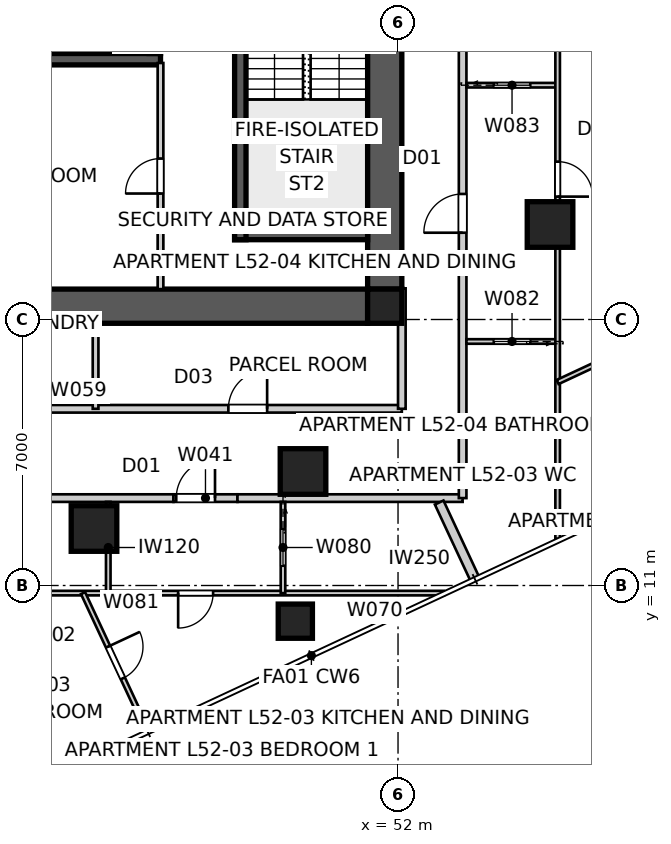
"""IFC4 building model, lengths in metres.
Left out: names, types, materials, properties, quantities, classifications, styles, units other than length and angle.
Written with IfcOpenShell. Run it as: python <this file> out.ifc"""

import sys

from ifc_helpers import new_model, si_unit, direction, frame, frame_2d, origin, origin_2d, place, context, subcontext, project, spatial, polyline, rectangle, outline, extrude, element, fill, save


model = new_model("IFC4")
c1 = context("Model", 3, precision=1e-05, world=origin(), true_north=direction((0.0, 1.0)))
c2 = subcontext(c1, "Body", "Model", "MODEL_VIEW")
j1 = project(units=[si_unit("LENGTHUNIT", "METRE"), si_unit("PLANEANGLEUNIT", "RADIAN")], contexts=[c1])
p1 = place(None, origin())
s1 = spatial("IfcSite", under=j1, at=p1, CompositionType="ELEMENT")
p2 = place(p1, origin())
s2 = spatial("IfcBuilding", under=s1, at=p2, CompositionType="ELEMENT")
p3 = place(p2, frame((0.0, 0.0, 189.6)))
s3 = spatial("IfcBuildingStorey", under=s2, at=p3, CompositionType="ELEMENT", Elevation=189.6)
p4 = place(p3, frame((51.2, 18.35, 0.0), z_axis=(0.0, 0.0, 1.0), x_axis=(-1.0, 0.0, 0.0)))
e1 = element("IfcWall", 1, at=p4, inside=s3, PredefinedType="SHEAR", context=c2, shape_type="SweptSolid", body=[
    extrude(outline(polyline([(0.0, -0.45), (22.4, -0.45), (22.4, -0.025), (22.85, -0.025), (22.85, 0.025), (22.4, 0.025), (22.4, 0.45), (0.0, 0.45), (0.0, 0.025), (-0.45, 0.025), (-0.45, -0.025), (0.0, -0.025), (0.0, -0.45)])), origin(), (0.0, 0.0, 1.0), 3.4),
])
p5 = place(p3, frame((51.65, 18.8, 0.0), z_axis=(0.0, 0.0, 1.0), x_axis=(0.0, 1.0, 0.0)))
e2 = element("IfcWall", 2, at=p5, inside=s3, PredefinedType="SHEAR", context=c2, shape_type="SweptSolid", body=[
    extrude(outline(polyline([(0.0, -0.45), (22.4, -0.45), (22.4, -0.025), (22.85, -0.025), (22.85, 0.025), (22.4, 0.025), (22.4, 0.45), (0.0, 0.45), (0.0, 0.025), (-0.45, 0.025), (-0.45, -0.025), (0.0, -0.025), (0.0, -0.45)])), origin(), (0.0, 0.0, 1.0), 3.4),
])
p6 = place(p5, frame((11.14, 0.0, 0.0)))
e3 = element("IfcOpeningElement", 3, at=p6, cuts=e2, PredefinedType="OPENING", context=c2, shape_type="SweptSolid", body=[
    extrude(rectangle(XDim=1.02, YDim=2.4, at=frame_2d((0.51, 1.2))), frame((0.0, 0.46, 0.0), z_axis=(0.0, -1.0, 0.0), x_axis=(1.0, 0.0, 0.0)), (0.0, 0.0, 1.0), 0.92),
])
p7 = place(p3, frame((45.75, 24.85, 0.0), z_axis=(0.0, 0.0, 1.0), x_axis=(-1.0, 0.0, 0.0)))
e4 = element("IfcWall", 4, at=p7, inside=s3, PredefinedType="SHEAR", context=c2, shape_type="SweptSolid", body=[
    extrude(rectangle(XDim=11.5, YDim=0.3, at=frame_2d((5.75, 0.0))), origin(), (0.0, 0.0, 1.0), 3.4),
])
p8 = place(p3, frame((45.6, 27.8, 0.0), z_axis=(0.0, 0.0, 1.0), x_axis=(0.0, -1.0, 0.0)))
e5 = element("IfcWall", 5, at=p8, inside=s3, PredefinedType="SHEAR", context=c2, shape_type="SweptSolid", body=[
    extrude(rectangle(XDim=2.8, YDim=0.3, at=frame_2d((1.4, 0.0))), origin(), (0.0, 0.0, 1.0), 3.4),
])
p9 = place(p3, frame((47.85, 27.8, 0.0), z_axis=(0.0, 0.0, 1.0), x_axis=(0.0, -1.0, 0.0)))
e6 = element("IfcWall", 6, at=p9, inside=s3, PredefinedType="SHEAR", context=c2, shape_type="SweptSolid", body=[
    extrude(rectangle(XDim=7.7, YDim=0.3, at=frame_2d((3.85, 0.0))), origin(), (0.0, 0.0, 1.0), 3.4),
])
p10 = place(p3, frame((51.2, 20.25, 0.0), z_axis=(0.0, 0.0, 1.0), x_axis=(-1.0, 0.0, 0.0)))
e7 = element("IfcWall", 7, at=p10, inside=s3, PredefinedType="SHEAR", context=c2, shape_type="SweptSolid", body=[
    extrude(rectangle(XDim=3.5, YDim=0.3, at=frame_2d((1.75, 0.0))), origin(), (0.0, 0.0, 1.0), 3.4),
])
for number, where, z_axis, x_axis in (
    (8, (51.65, 18.35, 0.0), (0.0, 0.0, 1.0), (1.0, 0.0, 0.0)),
    (9, (49.298, 10.061, 0.0), (0.0, 0.0, 1.0), (1.0, 0.0, 0.0)),
):
    element("IfcColumn", number, at=place(p3, frame(where, z_axis=z_axis, x_axis=x_axis)), inside=s3, PredefinedType="COLUMN", context=c2, shape_type="SweptSolid", body=[
        extrude(rectangle(XDim=0.9, YDim=0.9, at=origin_2d()), origin(), (0.0, 0.0, 1.0), 3.4),
    ])
for number, where, z_axis, x_axis in (
    (10, (44.0, 12.5, 0.0), (0.0, 0.0, 1.0), (1.0, 0.0, 0.0)),
    (11, (49.5, 14.0, 0.0), (0.0, 0.0, 1.0), (1.0, 0.0, 0.0)),
    (12, (56.0, 20.5, 0.0), (0.0, 0.0, 1.0), (1.0, 0.0, 0.0)),
):
    element("IfcColumn", number, at=place(p3, frame(where, z_axis=z_axis, x_axis=x_axis)), inside=s3, PredefinedType="COLUMN", context=c2, shape_type="SweptSolid", body=[
        extrude(rectangle(XDim=1.2, YDim=1.2, at=origin_2d()), origin(), (0.0, 0.0, 1.0), 3.4),
    ])
p11 = place(p3, frame((33.908, 13.3, 0.0), z_axis=(0.0, 0.0, 1.0), x_axis=(1.0, 0.0, 0.0)))
e13 = element("IfcWall", 13, at=p11, inside=s3, PredefinedType="PARTITIONING", context=c2, shape_type="SweptSolid", body=[
    extrude(rectangle(XDim=12.183, YDim=0.2, at=frame_2d((6.092, 0.0))), origin(), (0.0, 0.0, 1.0), 3.25),
])
p12 = place(p3, frame((46.092, 13.3, 0.0), z_axis=(0.0, 0.0, 1.0), x_axis=(1.0, 0.0, 0.0)))
e14 = element("IfcWall", 14, at=p12, inside=s3, PredefinedType="PARTITIONING", context=c2, shape_type="SweptSolid", body=[
    extrude(rectangle(XDim=1.684, YDim=0.2, at=frame_2d((0.842, 0.0))), origin(), (0.0, 0.0, 1.0), 2.55),
])
p13 = place(p12, frame((0.073, 0.0, 0.0)))
e15 = element("IfcOpeningElement", 15, at=p13, cuts=e14, PredefinedType="OPENING", context=c2, shape_type="SweptSolid", body=[
    extrude(rectangle(XDim=1.02, YDim=2.34, at=frame_2d((0.51, 1.17))), frame((0.0, 0.11, 0.0), z_axis=(0.0, -1.0, 0.0), x_axis=(1.0, 0.0, 0.0)), (0.0, 0.0, 1.0), 0.22),
])
p14 = place(p3, frame((47.775, 13.3, 0.0), z_axis=(0.0, 0.0, 1.0), x_axis=(1.0, 0.0, 0.0)))
e16 = element("IfcWall", 16, at=p14, inside=s3, PredefinedType="PARTITIONING", context=c2, shape_type="SweptSolid", body=[
    extrude(rectangle(XDim=5.925, YDim=0.2, at=frame_2d((2.962, 0.0))), origin(), (0.0, 0.0, 1.0), 3.25),
])
p15 = place(p3, frame((53.7, 13.3, 0.0), z_axis=(0.0, 0.0, 1.0), x_axis=(0.0, 1.0, 0.0)))
e17 = element("IfcWall", 17, at=p15, inside=s3, PredefinedType="PARTITIONING", context=c2, shape_type="SweptSolid", body=[
    extrude(rectangle(XDim=33.8, YDim=0.2, at=frame_2d((16.9, 0.0))), origin(), (0.0, 0.0, 1.0), 3.25),
])
p16 = place(p15, frame((6.984, 0.0, 0.0)))
e18 = element("IfcOpeningElement", 18, at=p16, cuts=e17, PredefinedType="OPENING", context=c2, shape_type="SweptSolid", body=[
    extrude(rectangle(XDim=1.02, YDim=2.34, at=frame_2d((0.51, 1.17))), frame((0.0, 0.11, 0.0), z_axis=(0.0, -1.0, 0.0), x_axis=(1.0, 0.0, 0.0)), (0.0, 0.0, 1.0), 0.22),
])
p17 = place(p15, frame((29.648, 0.0, 0.0)))
e19 = element("IfcOpeningElement", 19, at=p17, cuts=e17, PredefinedType="OPENING", context=c2, shape_type="SweptSolid", body=[
    extrude(rectangle(XDim=1.02, YDim=2.34, at=frame_2d((0.51, 1.17))), frame((0.0, 0.11, 0.0), z_axis=(0.0, -1.0, 0.0), x_axis=(1.0, 0.0, 0.0)), (0.0, 0.0, 1.0), 0.22),
])
p18 = place(p15, frame((15.16, 0.0, 0.0)))
e20 = element("IfcOpeningElement", 20, at=p18, cuts=e17, PredefinedType="OPENING", context=c2, shape_type="SweptSolid", body=[
    extrude(rectangle(XDim=1.02, YDim=2.34, at=frame_2d((0.51, 1.17))), frame((0.0, 0.11, 0.0), z_axis=(0.0, -1.0, 0.0), x_axis=(1.0, 0.0, 0.0)), (0.0, 0.0, 1.0), 0.22),
])
p19 = place(p3, frame((54.025, 11.162, 0.0), z_axis=(0.0, 0.0, 1.0), x_axis=(-0.422609736898, 0.906311762187, 0.0)))
e21 = element("IfcWall", 21, at=p19, inside=s3, PredefinedType="PARTITIONING", context=c2, shape_type="SweptSolid", body=[
    extrude(rectangle(XDim=2.23, YDim=0.25, at=frame_2d((1.115, 0.0))), origin(), (0.0, 0.0, 1.0), 3.25),
])
p20 = place(p3, frame((45.75, 18.8, 0.0), z_axis=(0.0, 0.0, 1.0), x_axis=(0.0, 1.0, 0.0)))
e22 = element("IfcWall", 22, at=p20, inside=s3, PredefinedType="SOLIDWALL", context=c2, shape_type="SweptSolid", body=[
    extrude(rectangle(XDim=5.95, YDim=0.15, at=frame_2d((2.975, 0.0))), origin(), (0.0, 0.0, 1.0), 3.25),
])
p21 = place(p20, frame((2.515, 0.0, 0.0)))
e23 = element("IfcOpeningElement", 23, at=p21, cuts=e22, PredefinedType="OPENING", context=c2, shape_type="SweptSolid", body=[
    extrude(rectangle(XDim=0.92, YDim=2.1, at=frame_2d((0.46, 1.05))), frame((0.0, 0.085, 0.0), z_axis=(0.0, -1.0, 0.0), x_axis=(1.0, 0.0, 0.0)), (0.0, 0.0, 1.0), 0.17),
])
p22 = place(p3, frame((27.9, 15.65, 0.0), z_axis=(0.0, 0.0, 1.0), x_axis=(1.0, 0.0, 0.0)))
e24 = element("IfcWall", 24, at=p22, inside=s3, PredefinedType="PARTITIONING", context=c2, shape_type="SweptSolid", body=[
    extrude(rectangle(XDim=24.2, YDim=0.2, at=frame_2d((12.1, 0.0))), origin(), (0.0, 0.0, 1.0), 3.25),
])
p23 = place(p22, frame((10.743, 0.0, 0.0)))
e25 = element("IfcOpeningElement", 25, at=p23, cuts=e24, PredefinedType="OPENING", context=c2, shape_type="SweptSolid", body=[
    extrude(rectangle(XDim=1.02, YDim=2.1, at=frame_2d((0.51, 1.05))), frame((0.0, 0.11, 0.0), z_axis=(0.0, -1.0, 0.0), x_axis=(1.0, 0.0, 0.0)), (0.0, 0.0, 1.0), 0.22),
])
p24 = place(p22, frame((19.636, 0.0, 0.0)))
e26 = element("IfcOpeningElement", 26, at=p24, cuts=e24, PredefinedType="OPENING", context=c2, shape_type="SweptSolid", body=[
    extrude(rectangle(XDim=1.02, YDim=2.1, at=frame_2d((0.51, 1.05))), frame((0.0, 0.11, 0.0), z_axis=(0.0, -1.0, 0.0), x_axis=(1.0, 0.0, 0.0)), (0.0, 0.0, 1.0), 0.22),
])
p25 = place(p22, frame((3.297, 0.0, 0.0)))
e27 = element("IfcOpeningElement", 27, at=p25, cuts=e24, PredefinedType="OPENING", context=c2, shape_type="SweptSolid", body=[
    extrude(rectangle(XDim=1.02, YDim=2.1, at=frame_2d((0.51, 1.05))), frame((0.0, 0.11, 0.0), z_axis=(0.0, -1.0, 0.0), x_axis=(1.0, 0.0, 0.0)), (0.0, 0.0, 1.0), 0.22),
])
p26 = place(p3, frame((52.1, 15.65, 0.0), z_axis=(0.0, 0.0, 1.0), x_axis=(0.0, 1.0, 0.0)))
e28 = element("IfcWall", 28, at=p26, inside=s3, PredefinedType="PARTITIONING", context=c2, shape_type="SweptSolid", body=[
    extrude(rectangle(XDim=3.17, YDim=0.2, at=frame_2d((1.585, 0.0))), origin(), (0.0, 0.0, 1.0), 3.25),
])
p27 = place(p3, frame((44.042, 15.65, 0.0), z_axis=(0.0, 0.0, 1.0), x_axis=(0.0, 1.0, 0.0)))
e29 = element("IfcWall", 29, at=p27, inside=s3, PredefinedType="SOLIDWALL", context=c2, shape_type="SweptSolid", body=[
    extrude(rectangle(XDim=2.25, YDim=0.15, at=frame_2d((1.125, 0.0))), origin(), (0.0, 0.0, 1.0), 3.25),
])
p28 = place(p3, frame((53.208, 10.8, 0.0), z_axis=(0.0, 0.0, 1.0), x_axis=(-1.0, 0.0, 0.0)))
e30 = element("IfcWall", 30, at=p28, inside=s3, PredefinedType="PARTITIONING", context=c2, shape_type="SweptSolid", body=[
    extrude(rectangle(XDim=29.593, YDim=0.12, at=frame_2d((14.796, 0.0))), origin(), (0.0, 0.0, 1.0), 3.25),
])
p29 = place(p28, frame((6.074, 0.0, 0.0)))
e31 = element("IfcOpeningElement", 31, at=p29, cuts=e30, PredefinedType="OPENING", context=c2, shape_type="SweptSolid", body=[
    extrude(rectangle(XDim=0.92, YDim=2.34, at=frame_2d((0.46, 1.17))), frame((0.0, 0.07, 0.0), z_axis=(0.0, -1.0, 0.0), x_axis=(1.0, 0.0, 0.0)), (0.0, 0.0, 1.0), 0.14),
])
p30 = place(p28, frame((25.566, 0.0, 0.0)))
e32 = element("IfcOpeningElement", 32, at=p30, cuts=e30, PredefinedType="OPENING", context=c2, shape_type="SweptSolid", body=[
    extrude(rectangle(XDim=0.92, YDim=2.34, at=frame_2d((0.46, 1.17))), frame((0.0, 0.07, 0.0), z_axis=(0.0, -1.0, 0.0), x_axis=(1.0, 0.0, 0.0)), (0.0, 0.0, 1.0), 0.14),
])
p31 = place(p28, frame((18.515, 0.0, 0.0)))
e33 = element("IfcOpeningElement", 33, at=p31, cuts=e30, PredefinedType="OPENING", context=c2, shape_type="SweptSolid", body=[
    extrude(rectangle(XDim=0.96, YDim=2.1, at=frame_2d((0.48, 1.05))), frame((0.0, 0.07, 0.0), z_axis=(0.0, -1.0, 0.0), x_axis=(1.0, 0.0, 0.0)), (0.0, 0.0, 1.0), 0.14),
])
p32 = place(p28, frame((15.493, 0.0, 0.0)))
e34 = element("IfcOpeningElement", 34, at=p32, cuts=e30, PredefinedType="OPENING", context=c2, shape_type="SweptSolid", body=[
    extrude(rectangle(XDim=0.96, YDim=2.1, at=frame_2d((0.48, 1.05))), frame((0.0, 0.07, 0.0), z_axis=(0.0, -1.0, 0.0), x_axis=(1.0, 0.0, 0.0)), (0.0, 0.0, 1.0), 0.14),
])
p33 = place(p28, frame((11.609, 0.0, 0.0)))
e35 = element("IfcOpeningElement", 35, at=p33, cuts=e30, PredefinedType="OPENING", context=c2, shape_type="SweptSolid", body=[
    extrude(rectangle(XDim=0.96, YDim=2.1, at=frame_2d((0.48, 1.05))), frame((0.0, 0.07, 0.0), z_axis=(0.0, -1.0, 0.0), x_axis=(1.0, 0.0, 0.0)), (0.0, 0.0, 1.0), 0.14),
])
p34 = place(p3, frame((44.375, 10.8, 0.0), z_axis=(0.0, 0.0, 1.0), x_axis=(0.0, 1.0, 0.0)))
e36 = element("IfcWall", 36, at=p34, inside=s3, PredefinedType="PARTITIONING", context=c2, shape_type="SweptSolid", body=[
    extrude(rectangle(XDim=2.4, YDim=0.12, at=frame_2d((1.2, 0.0))), origin(), (0.0, 0.0, 1.0), 3.25),
])
p35 = place(p3, frame((48.973, 13.2, 0.0), z_axis=(0.0, 0.0, 1.0), x_axis=(0.0, -1.0, 0.0)))
e37 = element("IfcWall", 37, at=p35, inside=s3, PredefinedType="PARTITIONING", context=c2, shape_type="SweptSolid", body=[
    extrude(rectangle(XDim=2.4, YDim=0.12, at=frame_2d((1.2, 0.0))), origin(), (0.0, 0.0, 1.0), 3.25),
])
p36 = place(p35, frame((0.72, 0.0, 0.0)))
e38 = element("IfcOpeningElement", 38, at=p36, cuts=e37, PredefinedType="OPENING", context=c2, shape_type="SweptSolid", body=[
    extrude(rectangle(XDim=0.96, YDim=2.1, at=frame_2d((0.48, 1.05))), frame((0.0, 0.07, 0.0), z_axis=(0.0, -1.0, 0.0), x_axis=(1.0, 0.0, 0.0)), (0.0, 0.0, 1.0), 0.14),
])
p37 = place(p3, frame((43.712, 10.8, 0.0), z_axis=(0.0, 0.0, 1.0), x_axis=(0.422620823304, -0.906306592556, 0.0)))
e39 = element("IfcWall", 39, at=p37, inside=s3, PredefinedType="PARTITIONING", context=c2, shape_type="SweptSolid", body=[
    extrude(rectangle(XDim=3.99, YDim=0.12, at=frame_2d((1.995, 0.0))), origin(), (0.0, 0.0, 1.0), 3.25),
])
p38 = place(p37, frame((1.555, 0.0, 0.0)))
e40 = element("IfcOpeningElement", 40, at=p38, cuts=e39, PredefinedType="OPENING", context=c2, shape_type="SweptSolid", body=[
    extrude(rectangle(XDim=0.92, YDim=2.34, at=frame_2d((0.46, 1.17))), frame((0.0, 0.07, 0.0), z_axis=(0.0, -1.0, 0.0), x_axis=(1.0, 0.0, 0.0)), (0.0, 0.0, 1.0), 0.14),
])
p39 = place(p3, frame((56.2, 17.422, 0.0), z_axis=(0.0, 0.0, 1.0), x_axis=(-1.0, 0.0, 0.0)))
e41 = element("IfcWall", 41, at=p39, inside=s3, PredefinedType="PARTITIONING", context=c2, shape_type="SweptSolid", body=[
    extrude(rectangle(XDim=2.4, YDim=0.12, at=frame_2d((1.2, 0.0))), origin(), (0.0, 0.0, 1.0), 3.25),
])
p40 = place(p39, frame((0.72, 0.0, 0.0)))
e42 = element("IfcOpeningElement", 42, at=p40, cuts=e41, PredefinedType="OPENING", context=c2, shape_type="SweptSolid", body=[
    extrude(rectangle(XDim=0.96, YDim=2.1, at=frame_2d((0.48, 1.05))), frame((0.0, 0.07, 0.0), z_axis=(0.0, -1.0, 0.0), x_axis=(1.0, 0.0, 0.0)), (0.0, 0.0, 1.0), 0.14),
])
p41 = place(p3, frame((53.8, 24.166, 0.0), z_axis=(0.0, 0.0, 1.0), x_axis=(1.0, 0.0, 0.0)))
e43 = element("IfcWall", 43, at=p41, inside=s3, PredefinedType="PARTITIONING", context=c2, shape_type="SweptSolid", body=[
    extrude(rectangle(XDim=2.4, YDim=0.12, at=frame_2d((1.2, 0.0))), origin(), (0.0, 0.0, 1.0), 2.796),
])
p42 = place(p41, frame((0.72, 0.0, 0.0)))
e44 = element("IfcOpeningElement", 44, at=p42, cuts=e43, PredefinedType="OPENING", context=c2, shape_type="SweptSolid", body=[
    extrude(rectangle(XDim=0.96, YDim=2.1, at=frame_2d((0.48, 1.05))), frame((0.0, 0.07, 0.0), z_axis=(0.0, -1.0, 0.0), x_axis=(1.0, 0.0, 0.0)), (0.0, 0.0, 1.0), 0.14),
])
p43 = place(p3, frame((56.2, 49.642, 0.0), z_axis=(0.0, 0.0, 1.0), x_axis=(0.0, -1.0, 0.0)))
e45 = element("IfcWall", 45, at=p43, inside=s3, PredefinedType="PARTITIONING", context=c2, shape_type="SweptSolid", body=[
    extrude(rectangle(XDim=37.421, YDim=0.12, at=frame_2d((18.71, 0.0))), origin(), (0.0, 0.0, 1.0), 2.55),
])
p44 = place(p43, frame((27.488, 0.0, 0.0)))
e46 = element("IfcOpeningElement", 46, at=p44, cuts=e45, PredefinedType="OPENING", context=c2, shape_type="SweptSolid", body=[
    extrude(rectangle(XDim=0.92, YDim=2.34, at=frame_2d((0.46, 1.17))), frame((0.0, 0.07, 0.0), z_axis=(0.0, -1.0, 0.0), x_axis=(1.0, 0.0, 0.0)), (0.0, 0.0, 1.0), 0.14),
])
p45 = place(p43, frame((5.08, 0.0, 0.0)))
e47 = element("IfcOpeningElement", 47, at=p45, cuts=e45, PredefinedType="OPENING", context=c2, shape_type="SweptSolid", body=[
    extrude(rectangle(XDim=0.92, YDim=2.34, at=frame_2d((0.46, 1.17))), frame((0.0, 0.07, 0.0), z_axis=(0.0, -1.0, 0.0), x_axis=(1.0, 0.0, 0.0)), (0.0, 0.0, 1.0), 0.14),
])
p46 = place(p43, frame((19.592, 0.0, 0.0)))
e48 = element("IfcOpeningElement", 48, at=p46, cuts=e45, PredefinedType="OPENING", context=c2, shape_type="SweptSolid", body=[
    extrude(rectangle(XDim=0.92, YDim=2.34, at=frame_2d((0.46, 1.17))), frame((0.0, 0.07, 0.0), z_axis=(0.0, -1.0, 0.0), x_axis=(1.0, 0.0, 0.0)), (0.0, 0.0, 1.0), 0.14),
])
p47 = place(p3, frame((65.303, 20.6, 0.0), z_axis=(0.0, 0.0, 1.0), x_axis=(-0.906300466163, -0.422633961049, 0.0)))
e49 = element("IfcWall", 49, at=p47, inside=s3, PredefinedType="PARTITIONING", context=c2, shape_type="SweptSolid", body=[
    extrude(rectangle(XDim=10.044, YDim=0.12, at=frame_2d((5.022, 0.0))), origin(), (0.0, 0.0, 1.0), 3.25),
])
p48 = place(p47, frame((6.892, 0.0, 0.0)))
e50 = element("IfcOpeningElement", 50, at=p48, cuts=e49, PredefinedType="OPENING", context=c2, shape_type="SweptSolid", body=[
    extrude(rectangle(XDim=0.92, YDim=2.34, at=frame_2d((0.46, 1.17))), frame((0.0, 0.07, 0.0), z_axis=(0.0, -1.0, 0.0), x_axis=(1.0, 0.0, 0.0)), (0.0, 0.0, 1.0), 0.14),
])
p49 = place(p47, frame((1.9, 0.0, 0.0)))
e51 = element("IfcOpeningElement", 51, at=p49, cuts=e49, PredefinedType="OPENING", context=c2, shape_type="SweptSolid", body=[
    extrude(rectangle(XDim=0.92, YDim=2.34, at=frame_2d((0.46, 1.17))), frame((0.0, 0.07, 0.0), z_axis=(0.0, -1.0, 0.0), x_axis=(1.0, 0.0, 0.0)), (0.0, 0.0, 1.0), 0.14),
])
p50 = place(p24, origin())
e52 = element("IfcDoor", 52, at=p50, inside=s3, OperationType="SINGLE_SWING_RIGHT", PredefinedType="DOOR", context=c2, shape_type="SweptSolid", body=[
    extrude(rectangle(XDim=1.02, YDim=2.1, at=frame_2d((0.51, 1.05))), frame((0.0, 0.025, 0.0), z_axis=(0.0, -1.0, 0.0), x_axis=(1.0, 0.0, 0.0)), (0.0, 0.0, 1.0), 0.05),
])
fill(e26, e52)
p51 = place(p16, origin())
e53 = element("IfcDoor", 53, at=p51, inside=s3, OperationType="SINGLE_SWING_LEFT", PredefinedType="DOOR", context=c2, shape_type="SweptSolid", body=[
    extrude(rectangle(XDim=1.02, YDim=2.34, at=frame_2d((0.51, 1.17))), frame((0.0, 0.025, 0.0), z_axis=(0.0, -1.0, 0.0), x_axis=(1.0, 0.0, 0.0)), (0.0, 0.0, 1.0), 0.05),
])
fill(e18, e53)
p52 = place(p13, origin())
e54 = element("IfcDoor", 54, at=p52, inside=s3, OperationType="SINGLE_SWING_RIGHT", PredefinedType="DOOR", context=c2, shape_type="SweptSolid", body=[
    extrude(rectangle(XDim=1.02, YDim=2.34, at=frame_2d((0.51, 1.17))), frame((0.0, 0.025, 0.0), z_axis=(0.0, -1.0, 0.0), x_axis=(1.0, 0.0, 0.0)), (0.0, 0.0, 1.0), 0.05),
])
fill(e15, e54)
p53 = place(p21, origin())
e55 = element("IfcDoor", 55, at=p53, inside=s3, OperationType="SINGLE_SWING_LEFT", PredefinedType="DOOR", context=c2, shape_type="SweptSolid", body=[
    extrude(rectangle(XDim=0.92, YDim=2.1, at=frame_2d((0.46, 1.05))), frame((0.0, 0.025, 0.0), z_axis=(0.0, -1.0, 0.0), x_axis=(1.0, 0.0, 0.0)), (0.0, 0.0, 1.0), 0.05),
])
fill(e23, e55)
p54 = place(p44, origin())
e56 = element("IfcDoor", 56, at=p54, inside=s3, OperationType="SINGLE_SWING_RIGHT", PredefinedType="DOOR", context=c2, shape_type="SweptSolid", body=[
    extrude(rectangle(XDim=0.92, YDim=2.34, at=frame_2d((0.46, 1.17))), frame((0.0, 0.025, 0.0), z_axis=(0.0, -1.0, 0.0), x_axis=(1.0, 0.0, 0.0)), (0.0, 0.0, 1.0), 0.05),
])
fill(e46, e56)
p55 = place(p40, origin())
e57 = element("IfcDoor", 57, at=p55, inside=s3, OperationType="SLIDING_TO_LEFT", PredefinedType="DOOR", context=c2, shape_type="SweptSolid", body=[
    extrude(rectangle(XDim=0.96, YDim=2.1, at=frame_2d((0.48, 1.05))), frame((0.0, 0.025, 0.0), z_axis=(0.0, -1.0, 0.0), x_axis=(1.0, 0.0, 0.0)), (0.0, 0.0, 1.0), 0.05),
])
fill(e42, e57)
p56 = place(p42, origin())
e58 = element("IfcDoor", 58, at=p56, inside=s3, OperationType="SLIDING_TO_LEFT", PredefinedType="DOOR", context=c2, shape_type="SweptSolid", body=[
    extrude(rectangle(XDim=0.96, YDim=2.1, at=frame_2d((0.48, 1.05))), frame((0.0, 0.025, 0.0), z_axis=(0.0, -1.0, 0.0), x_axis=(1.0, 0.0, 0.0)), (0.0, 0.0, 1.0), 0.05),
])
fill(e44, e58)
p57 = place(p29, origin())
e59 = element("IfcDoor", 59, at=p57, inside=s3, OperationType="SINGLE_SWING_RIGHT", PredefinedType="DOOR", context=c2, shape_type="SweptSolid", body=[
    extrude(rectangle(XDim=0.92, YDim=2.34, at=frame_2d((0.46, 1.17))), frame((0.0, 0.025, 0.0), z_axis=(0.0, -1.0, 0.0), x_axis=(1.0, 0.0, 0.0)), (0.0, 0.0, 1.0), 0.05),
])
fill(e31, e59)
p58 = place(p36, origin())
e60 = element("IfcDoor", 60, at=p58, inside=s3, OperationType="SLIDING_TO_LEFT", PredefinedType="DOOR", context=c2, shape_type="SweptSolid", body=[
    extrude(rectangle(XDim=0.96, YDim=2.1, at=frame_2d((0.48, 1.05))), frame((0.0, 0.025, 0.0), z_axis=(0.0, -1.0, 0.0), x_axis=(1.0, 0.0, 0.0)), (0.0, 0.0, 1.0), 0.05),
])
fill(e38, e60)
p59 = place(p38, origin())
e61 = element("IfcDoor", 61, at=p59, inside=s3, OperationType="SINGLE_SWING_LEFT", PredefinedType="DOOR", context=c2, shape_type="SweptSolid", body=[
    extrude(rectangle(XDim=0.92, YDim=2.34, at=frame_2d((0.46, 1.17))), frame((0.0, 0.025, 0.0), z_axis=(0.0, -1.0, 0.0), x_axis=(1.0, 0.0, 0.0)), (0.0, 0.0, 1.0), 0.05),
])
fill(e40, e61)
save(model, sys.argv[1])
